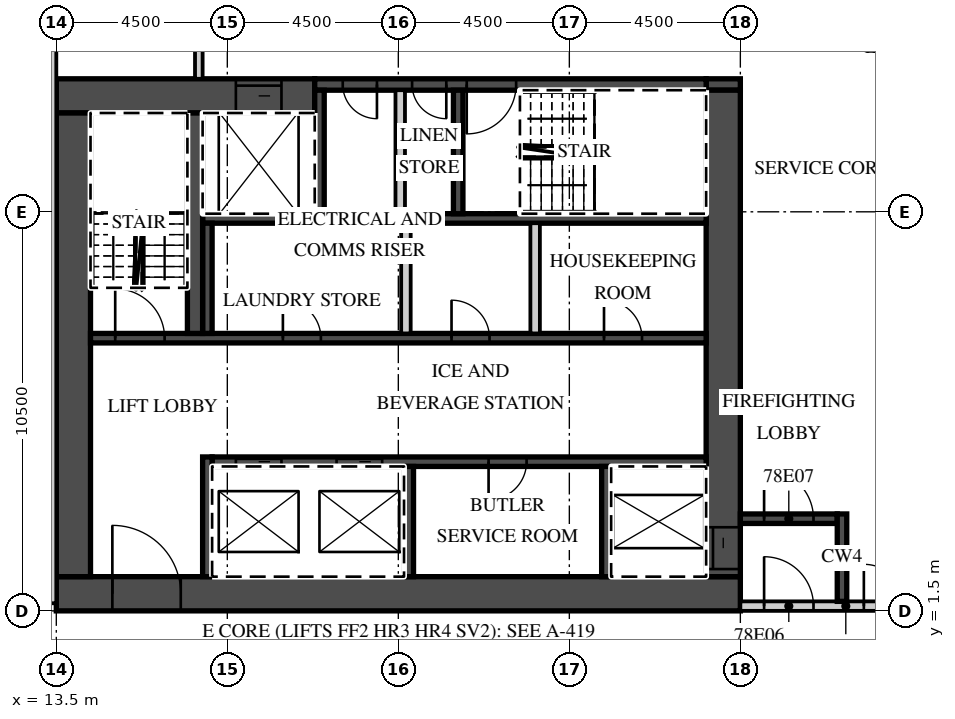
"""IFC4 building model, lengths in metres.
Left out: names, types, materials, properties, quantities, classifications, styles, units other than length and angle.
Written with IfcOpenShell. Run it as: python <this file> out.ifc"""

import sys

from ifc_helpers import new_model, si_unit, direction, frame, frame_2d, origin, place, context, subcontext, project, spatial, rectangle, extrude, element, fill, save


model = new_model("IFC4")
c1 = context("Model", 3, precision=1e-05, world=origin(), true_north=direction((0.0, 1.0)))
c2 = subcontext(c1, "Body", "Model", "MODEL_VIEW")
j1 = project(units=[si_unit("LENGTHUNIT", "METRE"), si_unit("PLANEANGLEUNIT", "RADIAN")], contexts=[c1])
p1 = place(None, origin())
s1 = spatial("IfcSite", under=j1, at=p1, CompositionType="ELEMENT")
p2 = place(p1, origin())
s2 = spatial("IfcBuilding", under=s1, at=p2, CompositionType="ELEMENT")
p3 = place(p2, frame((0.0, 0.0, 308.1)))
s3 = spatial("IfcBuildingStorey", under=s2, at=p3, CompositionType="ELEMENT", Elevation=308.1)
p4 = place(p3, frame((13.5, 1.95, 0.0), z_axis=(0.0, 0.0, 1.0), x_axis=(1.0, 0.0, 0.0)))
e1 = element("IfcWall", 1, at=p4, inside=s3, PredefinedType="SHEAR", context=c2, shape_type="SweptSolid", body=[
    extrude(rectangle(XDim=18.0, YDim=0.9, at=frame_2d((9.0, 0.0))), origin(), (0.0, 0.0, 1.0), 5.1),
])
p5 = place(p4, frame((1.475, 0.0, 0.0)))
e2 = element("IfcOpeningElement", 2, at=p5, cuts=e1, PredefinedType="OPENING", context=c2, shape_type="SweptSolid", body=[
    extrude(rectangle(XDim=1.8, YDim=2.1, at=frame_2d((0.9, 1.05))), frame((0.0, 0.46, 0.0), z_axis=(0.0, -1.0, 0.0), x_axis=(1.0, 0.0, 0.0)), (0.0, 0.0, 1.0), 0.92),
])
p6 = place(p3, frame((13.5, 15.05, 0.0), z_axis=(0.0, 0.0, 1.0), x_axis=(1.0, 0.0, 0.0)))
e3 = element("IfcWall", 3, at=p6, inside=s3, PredefinedType="SHEAR", context=c2, shape_type="SweptSolid", body=[
    extrude(rectangle(XDim=6.8, YDim=0.9, at=frame_2d((3.4, 0.0))), origin(), (0.0, 0.0, 1.0), 5.1),
])
p7 = place(p6, frame((4.725, 0.0, 0.0)))
e4 = element("IfcOpeningElement", 4, at=p7, cuts=e3, PredefinedType="OPENING", context=c2, shape_type="SweptSolid", body=[
    extrude(rectangle(XDim=1.2, YDim=2.1, at=frame_2d((0.6, 1.05))), frame((0.0, 0.46, 0.0), z_axis=(0.0, -1.0, 0.0), x_axis=(1.0, 0.0, 0.0)), (0.0, 0.0, 1.0), 0.92),
])
p8 = place(p3, frame((30.6, 15.35, 0.0), z_axis=(0.0, 0.0, 1.0), x_axis=(1.0, 0.0, 0.0)))
e5 = element("IfcWall", 5, at=p8, inside=s3, PredefinedType="SHEAR", context=c2, shape_type="SweptSolid", body=[
    extrude(rectangle(XDim=0.9, YDim=0.3, at=frame_2d((0.45, 0.0))), origin(), (0.0, 0.0, 1.0), 5.1),
])
p9 = place(p3, frame((20.3, 15.35, 0.0), z_axis=(0.0, 0.0, 1.0), x_axis=(1.0, 0.0, 0.0)))
e6 = element("IfcWall", 6, at=p9, inside=s3, PredefinedType="SHEAR", context=c2, shape_type="SweptSolid", body=[
    extrude(rectangle(XDim=10.3, YDim=0.3, at=frame_2d((5.15, 0.0))), origin(), (0.0, 0.0, 1.0), 5.1),
])
p10 = place(p9, frame((4.0, 0.0, 0.0)))
e7 = element("IfcOpeningElement", 7, at=p10, cuts=e6, PredefinedType="OPENING", context=c2, shape_type="SweptSolid", body=[
    extrude(rectangle(XDim=1.3, YDim=2.1, at=frame_2d((0.65, 1.05))), frame((0.0, 0.16, 0.0), z_axis=(0.0, -1.0, 0.0), x_axis=(1.0, 0.0, 0.0)), (0.0, 0.0, 1.0), 0.32),
])
p11 = place(p9, frame((2.562, 0.0, 0.0)))
e8 = element("IfcOpeningElement", 8, at=p11, cuts=e6, PredefinedType="OPENING", context=c2, shape_type="SweptSolid", body=[
    extrude(rectangle(XDim=0.9, YDim=2.1, at=frame_2d((0.45, 1.05))), frame((0.0, 0.16, 0.0), z_axis=(0.0, -1.0, 0.0), x_axis=(1.0, 0.0, 0.0)), (0.0, 0.0, 1.0), 0.32),
])
p12 = place(p9, frame((0.738, 0.0, 0.0)))
e9 = element("IfcOpeningElement", 9, at=p12, cuts=e6, PredefinedType="OPENING", context=c2, shape_type="SweptSolid", body=[
    extrude(rectangle(XDim=0.9, YDim=2.1, at=frame_2d((0.45, 1.05))), frame((0.0, 0.16, 0.0), z_axis=(0.0, -1.0, 0.0), x_axis=(1.0, 0.0, 0.0)), (0.0, 0.0, 1.0), 0.32),
])
p13 = place(p3, frame((31.05, 2.4, 0.0), z_axis=(0.0, 0.0, 1.0), x_axis=(0.0, 1.0, 0.0)))
e10 = element("IfcWall", 10, at=p13, inside=s3, PredefinedType="SHEAR", context=c2, shape_type="SweptSolid", body=[
    extrude(rectangle(XDim=12.8, YDim=0.9, at=frame_2d((6.4, 0.0))), origin(), (0.0, 0.0, 1.0), 5.1),
])
p14 = place(p13, frame((0.2, 0.0, 0.0)))
e11 = element("IfcOpeningElement", 11, at=p14, cuts=e10, PredefinedType="OPENING", context=c2, shape_type="SweptSolid", body=[
    extrude(rectangle(XDim=1.1, YDim=2.1, at=frame_2d((0.55, 1.05))), frame((0.0, 0.46, 0.0), z_axis=(0.0, -1.0, 0.0), x_axis=(1.0, 0.0, 0.0)), (0.0, 0.0, 1.0), 0.92),
])
p15 = place(p3, frame((13.95, 2.4, 0.0), z_axis=(0.0, 0.0, 1.0), x_axis=(0.0, 1.0, 0.0)))
e12 = element("IfcWall", 12, at=p15, inside=s3, PredefinedType="SHEAR", context=c2, shape_type="SweptSolid", body=[
    extrude(rectangle(XDim=12.2, YDim=0.9, at=frame_2d((6.1, 0.0))), origin(), (0.0, 0.0, 1.0), 5.1),
])
p16 = place(p3, frame((17.6, 5.425, 0.0), z_axis=(0.0, 0.0, 1.0), x_axis=(1.0, 0.0, 0.0)))
e13 = element("IfcWall", 13, at=p16, inside=s3, PredefinedType="SHEAR", context=c2, shape_type="SweptSolid", body=[
    extrude(rectangle(XDim=13.0, YDim=0.25, at=frame_2d((6.5, 0.0))), origin(), (0.0, 0.0, 1.0), 5.1),
])
p17 = place(p16, frame((3.275, 0.0, 0.0)))
e14 = element("IfcOpeningElement", 14, at=p17, cuts=e13, PredefinedType="OPENING", context=c2, shape_type="SweptSolid", body=[
    extrude(rectangle(XDim=1.2, YDim=2.1, at=frame_2d((0.6, 1.05))), frame((0.0, 0.135, 0.0), z_axis=(0.0, -1.0, 0.0), x_axis=(1.0, 0.0, 0.0)), (0.0, 0.0, 1.0), 0.27),
])
p18 = place(p16, frame((0.625, 0.0, 0.0)))
e15 = element("IfcOpeningElement", 15, at=p18, cuts=e13, PredefinedType="OPENING", context=c2, shape_type="SweptSolid", body=[
    extrude(rectangle(XDim=1.2, YDim=2.1, at=frame_2d((0.6, 1.05))), frame((0.0, 0.135, 0.0), z_axis=(0.0, -1.0, 0.0), x_axis=(1.0, 0.0, 0.0)), (0.0, 0.0, 1.0), 0.27),
])
p19 = place(p16, frame((7.275, 0.0, 0.0)))
e16 = element("IfcOpeningElement", 16, at=p19, cuts=e13, PredefinedType="OPENING", context=c2, shape_type="SweptSolid", body=[
    extrude(rectangle(XDim=1.0, YDim=2.1, at=frame_2d((0.5, 1.05))), frame((0.0, 0.135, 0.0), z_axis=(0.0, -1.0, 0.0), x_axis=(1.0, 0.0, 0.0)), (0.0, 0.0, 1.0), 0.27),
])
p20 = place(p3, frame((17.475, 2.4, 0.0), z_axis=(0.0, 0.0, 1.0), x_axis=(0.0, 1.0, 0.0)))
e17 = element("IfcWall", 17, at=p20, inside=s3, PredefinedType="SHEAR", context=c2, shape_type="SweptSolid", body=[
    extrude(rectangle(XDim=3.15, YDim=0.25, at=frame_2d((1.575, 0.0))), origin(), (0.0, 0.0, 1.0), 5.1),
])
for number, where, z_axis, x_axis in (
    (18, (27.975, 2.4, 0.0), (0.0, 0.0, 1.0), (0.0, 1.0, 0.0)),
    (19, (22.775, 2.4, 0.0), (0.0, 0.0, 1.0), (0.0, 1.0, 0.0)),
):
    element("IfcWall", number, at=place(p3, frame(where, z_axis=z_axis, x_axis=x_axis)), inside=s3, PredefinedType="SHEAR", context=c2, shape_type="SweptSolid", body=[
        extrude(rectangle(XDim=2.9, YDim=0.25, at=frame_2d((1.45, 0.0))), origin(), (0.0, 0.0, 1.0), 5.1),
    ])
p21 = place(p3, frame((14.4, 8.675, 0.0), z_axis=(0.0, 0.0, 1.0), x_axis=(1.0, 0.0, 0.0)))
e20 = element("IfcWall", 20, at=p21, inside=s3, PredefinedType="SHEAR", context=c2, shape_type="SweptSolid", body=[
    extrude(rectangle(XDim=16.2, YDim=0.25, at=frame_2d((8.1, 0.0))), origin(), (0.0, 0.0, 1.0), 5.1),
])
p22 = place(p21, frame((0.65, 0.0, 0.0)))
e21 = element("IfcOpeningElement", 21, at=p22, cuts=e20, PredefinedType="OPENING", context=c2, shape_type="SweptSolid", body=[
    extrude(rectangle(XDim=1.3, YDim=2.1, at=frame_2d((0.65, 1.05))), frame((0.0, 0.135, 0.0), z_axis=(0.0, -1.0, 0.0), x_axis=(1.0, 0.0, 0.0)), (0.0, 0.0, 1.0), 0.27),
])
p23 = place(p21, frame((13.512, 0.0, 0.0)))
e22 = element("IfcOpeningElement", 22, at=p23, cuts=e20, PredefinedType="OPENING", context=c2, shape_type="SweptSolid", body=[
    extrude(rectangle(XDim=1.0, YDim=2.1, at=frame_2d((0.5, 1.05))), frame((0.0, 0.135, 0.0), z_axis=(0.0, -1.0, 0.0), x_axis=(1.0, 0.0, 0.0)), (0.0, 0.0, 1.0), 0.27),
])
p24 = place(p21, frame((9.5, 0.0, 0.0)))
e23 = element("IfcOpeningElement", 23, at=p24, cuts=e20, PredefinedType="OPENING", context=c2, shape_type="SweptSolid", body=[
    extrude(rectangle(XDim=1.0, YDim=2.1, at=frame_2d((0.5, 1.05))), frame((0.0, 0.135, 0.0), z_axis=(0.0, -1.0, 0.0), x_axis=(1.0, 0.0, 0.0)), (0.0, 0.0, 1.0), 0.27),
])
p25 = place(p21, frame((5.062, 0.0, 0.0)))
e24 = element("IfcOpeningElement", 24, at=p25, cuts=e20, PredefinedType="OPENING", context=c2, shape_type="SweptSolid", body=[
    extrude(rectangle(XDim=1.0, YDim=2.1, at=frame_2d((0.5, 1.05))), frame((0.0, 0.135, 0.0), z_axis=(0.0, -1.0, 0.0), x_axis=(1.0, 0.0, 0.0)), (0.0, 0.0, 1.0), 0.27),
])
p26 = place(p3, frame((17.35, 11.825, 0.0), z_axis=(0.0, 0.0, 1.0), x_axis=(1.0, 0.0, 0.0)))
e25 = element("IfcWall", 25, at=p26, inside=s3, PredefinedType="SHEAR", context=c2, shape_type="SweptSolid", body=[
    extrude(rectangle(XDim=13.25, YDim=0.25, at=frame_2d((6.625, 0.0))), origin(), (0.0, 0.0, 1.0), 5.1),
])
p27 = place(p3, frame((17.475, 8.8, 0.0), z_axis=(0.0, 0.0, 1.0), x_axis=(0.0, 1.0, 0.0)))
e26 = element("IfcWall", 26, at=p27, inside=s3, PredefinedType="SHEAR", context=c2, shape_type="SweptSolid", body=[
    extrude(rectangle(XDim=2.9, YDim=0.25, at=frame_2d((1.45, 0.0))), origin(), (0.0, 0.0, 1.0), 5.1),
])
for number, where, z_axis, x_axis in (
    (27, (26.1, 8.8, 0.0), (0.0, 0.0, 1.0), (0.0, 1.0, 0.0)),
    (28, (22.7, 8.8, 0.0), (0.0, 0.0, 1.0), (0.0, 1.0, 0.0)),
):
    element("IfcWall", number, at=place(p3, frame(where, z_axis=z_axis, x_axis=x_axis)), inside=s3, PredefinedType="PARTITIONING", context=c2, shape_type="SweptSolid", body=[
        extrude(rectangle(XDim=2.9, YDim=0.25, at=frame_2d((1.45, 0.0))), origin(), (0.0, 0.0, 1.0), 5.1),
    ])
p28 = place(p3, frame((17.15, 8.8, 0.0), z_axis=(0.0, 0.0, 1.0), x_axis=(0.0, 1.0, 0.0)))
e29 = element("IfcWall", 29, at=p28, inside=s3, PredefinedType="SHEAR", context=c2, shape_type="SweptSolid", body=[
    extrude(rectangle(XDim=5.8, YDim=0.4, at=frame_2d((2.9, 0.0))), origin(), (0.0, 0.0, 1.0), 5.1),
])
for number, where, z_axis, x_axis in (
    (30, (20.425, 11.95, 0.0), (0.0, 0.0, 1.0), (0.0, 1.0, 0.0)),
    (31, (24.075, 11.95, 0.0), (0.0, 0.0, 1.0), (0.0, 1.0, 0.0)),
):
    element("IfcWall", number, at=place(p3, frame(where, z_axis=z_axis, x_axis=x_axis)), inside=s3, PredefinedType="SHEAR", context=c2, shape_type="SweptSolid", body=[
        extrude(rectangle(XDim=3.25, YDim=0.25, at=frame_2d((1.625, 0.0))), origin(), (0.0, 0.0, 1.0), 5.1),
    ])
p29 = place(p3, frame((22.55, 11.95, 0.0), z_axis=(0.0, 0.0, 1.0), x_axis=(0.0, 1.0, 0.0)))
e32 = element("IfcWall", 32, at=p29, inside=s3, PredefinedType="PARTITIONING", context=c2, shape_type="SweptSolid", body=[
    extrude(rectangle(XDim=3.25, YDim=0.25, at=frame_2d((1.625, 0.0))), origin(), (0.0, 0.0, 1.0), 5.1),
])
p30 = place(p3, frame((31.5, 1.625, 0.0), z_axis=(0.0, 0.0, 1.0), x_axis=(1.0, 0.0, 0.0)))
e33 = element("IfcWall", 33, at=p30, inside=s3, PredefinedType="PARTITIONING", context=c2, shape_type="SweptSolid", body=[
    extrude(rectangle(XDim=5.55, YDim=0.25, at=frame_2d((2.775, 0.0))), origin(), (0.0, 0.0, 1.0), 5.1),
])
p31 = place(p30, frame((0.625, 0.0, 0.0)))
e34 = element("IfcOpeningElement", 34, at=p31, cuts=e33, PredefinedType="OPENING", context=c2, shape_type="SweptSolid", body=[
    extrude(rectangle(XDim=1.3, YDim=2.1, at=frame_2d((0.65, 1.05))), frame((0.0, 0.135, 0.0), z_axis=(0.0, -1.0, 0.0), x_axis=(1.0, 0.0, 0.0)), (0.0, 0.0, 1.0), 0.27),
])
p32 = place(p30, frame((3.25, 0.0, 0.0)))
e35 = element("IfcOpeningElement", 35, at=p32, cuts=e33, PredefinedType="OPENING", context=c2, shape_type="SweptSolid", body=[
    extrude(rectangle(XDim=1.1, YDim=2.1, at=frame_2d((0.55, 1.05))), frame((0.0, 0.135, 0.0), z_axis=(0.0, -1.0, 0.0), x_axis=(1.0, 0.0, 0.0)), (0.0, 0.0, 1.0), 0.27),
])
p33 = place(p3, frame((31.5, 3.925, 0.0), z_axis=(0.0, 0.0, 1.0), x_axis=(1.0, 0.0, 0.0)))
e36 = element("IfcWall", 36, at=p33, inside=s3, PredefinedType="SHEAR", context=c2, shape_type="SweptSolid", body=[
    extrude(rectangle(XDim=2.55, YDim=0.25, at=frame_2d((1.275, 0.0))), origin(), (0.0, 0.0, 1.0), 5.1),
])
p34 = place(p33, frame((0.625, 0.0, 0.0)))
e37 = element("IfcOpeningElement", 37, at=p34, cuts=e36, PredefinedType="OPENING", context=c2, shape_type="SweptSolid", body=[
    extrude(rectangle(XDim=1.3, YDim=2.1, at=frame_2d((0.65, 1.05))), frame((0.0, 0.135, 0.0), z_axis=(0.0, -1.0, 0.0), x_axis=(1.0, 0.0, 0.0)), (0.0, 0.0, 1.0), 0.27),
])
p35 = place(p3, frame((34.175, 1.75, 0.0), z_axis=(0.0, 0.0, 1.0), x_axis=(0.0, 1.0, 0.0)))
e38 = element("IfcWall", 38, at=p35, inside=s3, PredefinedType="SHEAR", context=c2, shape_type="SweptSolid", body=[
    extrude(rectangle(XDim=2.3, YDim=0.25, at=frame_2d((1.15, 0.0))), origin(), (0.0, 0.0, 1.0), 5.1),
])
p36 = place(p3, frame((17.25, 15.5, 0.0), z_axis=(0.0, 0.0, 1.0), x_axis=(0.0, 1.0, 0.0)))
e39 = element("IfcWall", 39, at=p36, inside=s3, PredefinedType="PARTITIONING", context=c2, shape_type="SweptSolid", body=[
    extrude(rectangle(XDim=2.55, YDim=0.2, at=frame_2d((1.275, 0.0))), origin(), (0.0, 0.0, 1.0), 5.1),
])
p37 = place(p3, frame((13.4, 1.7, 0.0), z_axis=(0.0, 0.0, 1.0), x_axis=(0.0, 1.0, 0.0)))
e40 = element("IfcWall", 40, at=p37, inside=s3, PredefinedType="PARTITIONING", context=c2, shape_type="SweptSolid", body=[
    extrude(rectangle(XDim=16.35, YDim=0.2, at=frame_2d((8.175, 0.0))), origin(), (0.0, 0.0, 1.0), 5.1),
])
p38 = place(p17, origin())
e41 = element("IfcDoor", 41, at=p38, inside=s3, OperationType="SLIDING_TO_RIGHT", PredefinedType="DOOR", context=c2, shape_type="SweptSolid", body=[
    extrude(rectangle(XDim=1.2, YDim=2.1, at=frame_2d((0.6, 1.05))), frame((0.0, 0.025, 0.0), z_axis=(0.0, -1.0, 0.0), x_axis=(1.0, 0.0, 0.0)), (0.0, 0.0, 1.0), 0.05),
])
fill(e14, e41)
p39 = place(p18, origin())
e42 = element("IfcDoor", 42, at=p39, inside=s3, OperationType="SLIDING_TO_LEFT", PredefinedType="DOOR", context=c2, shape_type="SweptSolid", body=[
    extrude(rectangle(XDim=1.2, YDim=2.1, at=frame_2d((0.6, 1.05))), frame((0.0, 0.025, 0.0), z_axis=(0.0, -1.0, 0.0), x_axis=(1.0, 0.0, 0.0)), (0.0, 0.0, 1.0), 0.05),
])
fill(e15, e42)
p40 = place(p7, origin())
e43 = element("IfcDoor", 43, at=p40, inside=s3, OperationType="SLIDING_TO_LEFT", PredefinedType="DOOR", context=c2, shape_type="SweptSolid", body=[
    extrude(rectangle(XDim=1.2, YDim=2.1, at=frame_2d((0.6, 1.05))), frame((0.0, 0.025, 0.0), z_axis=(0.0, -1.0, 0.0), x_axis=(1.0, 0.0, 0.0)), (0.0, 0.0, 1.0), 0.05),
])
fill(e4, e43)
p41 = place(p14, origin())
e44 = element("IfcDoor", 44, at=p41, inside=s3, OperationType="SLIDING_TO_LEFT", PredefinedType="DOOR", context=c2, shape_type="SweptSolid", body=[
    extrude(rectangle(XDim=1.1, YDim=2.1, at=frame_2d((0.55, 1.05))), frame((0.0, 0.025, 0.0), z_axis=(0.0, -1.0, 0.0), x_axis=(1.0, 0.0, 0.0)), (0.0, 0.0, 1.0), 0.05),
])
fill(e11, e44)
p42 = place(p5, origin())
e45 = element("IfcDoor", 45, at=p42, inside=s3, OperationType="DOUBLE_DOOR_DOUBLE_SWING", PredefinedType="DOOR", context=c2, shape_type="SweptSolid", body=[
    extrude(rectangle(XDim=1.8, YDim=2.1, at=frame_2d((0.9, 1.05))), frame((0.0, 0.025, 0.0), z_axis=(0.0, -1.0, 0.0), x_axis=(1.0, 0.0, 0.0)), (0.0, 0.0, 1.0), 0.05),
])
fill(e2, e45)
p43 = place(p31, origin())
e46 = element("IfcDoor", 46, at=p43, inside=s3, OperationType="SINGLE_SWING_LEFT", PredefinedType="DOOR", context=c2, shape_type="SweptSolid", body=[
    extrude(rectangle(XDim=1.3, YDim=2.1, at=frame_2d((0.65, 1.05))), frame((0.0, 0.025, 0.0), z_axis=(0.0, -1.0, 0.0), x_axis=(1.0, 0.0, 0.0)), (0.0, 0.0, 1.0), 0.05),
])
fill(e34, e46)
p44 = place(p34, origin())
e47 = element("IfcDoor", 47, at=p44, inside=s3, OperationType="SINGLE_SWING_LEFT", PredefinedType="DOOR", context=c2, shape_type="SweptSolid", body=[
    extrude(rectangle(XDim=1.3, YDim=2.1, at=frame_2d((0.65, 1.05))), frame((0.0, 0.025, 0.0), z_axis=(0.0, -1.0, 0.0), x_axis=(1.0, 0.0, 0.0)), (0.0, 0.0, 1.0), 0.05),
])
fill(e37, e47)
p45 = place(p32, origin())
e48 = element("IfcDoor", 48, at=p45, inside=s3, OperationType="SINGLE_SWING_LEFT", PredefinedType="DOOR", context=c2, shape_type="SweptSolid", body=[
    extrude(rectangle(XDim=1.1, YDim=2.1, at=frame_2d((0.55, 1.05))), frame((0.0, 0.025, 0.0), z_axis=(0.0, -1.0, 0.0), x_axis=(1.0, 0.0, 0.0)), (0.0, 0.0, 1.0), 0.05),
])
fill(e35, e48)
p46 = place(p22, origin())
e49 = element("IfcDoor", 49, at=p46, inside=s3, OperationType="SINGLE_SWING_LEFT", PredefinedType="DOOR", context=c2, shape_type="SweptSolid", body=[
    extrude(rectangle(XDim=1.3, YDim=2.1, at=frame_2d((0.65, 1.05))), frame((0.0, 0.025, 0.0), z_axis=(0.0, -1.0, 0.0), x_axis=(1.0, 0.0, 0.0)), (0.0, 0.0, 1.0), 0.05),
])
fill(e21, e49)
p47 = place(p10, origin())
e50 = element("IfcDoor", 50, at=p47, inside=s3, OperationType="SINGLE_SWING_LEFT", PredefinedType="DOOR", context=c2, shape_type="SweptSolid", body=[
    extrude(rectangle(XDim=1.3, YDim=2.1, at=frame_2d((0.65, 1.05))), frame((0.0, 0.025, 0.0), z_axis=(0.0, -1.0, 0.0), x_axis=(1.0, 0.0, 0.0)), (0.0, 0.0, 1.0), 0.05),
])
fill(e7, e50)
p48 = place(p11, origin())
e51 = element("IfcDoor", 51, at=p48, inside=s3, OperationType="SINGLE_SWING_RIGHT", PredefinedType="DOOR", context=c2, shape_type="SweptSolid", body=[
    extrude(rectangle(XDim=0.9, YDim=2.1, at=frame_2d((0.45, 1.05))), frame((0.0, 0.025, 0.0), z_axis=(0.0, -1.0, 0.0), x_axis=(1.0, 0.0, 0.0)), (0.0, 0.0, 1.0), 0.05),
])
fill(e8, e51)
p49 = place(p12, origin())
e52 = element("IfcDoor", 52, at=p49, inside=s3, OperationType="SINGLE_SWING_RIGHT", PredefinedType="DOOR", context=c2, shape_type="SweptSolid", body=[
    extrude(rectangle(XDim=0.9, YDim=2.1, at=frame_2d((0.45, 1.05))), frame((0.0, 0.025, 0.0), z_axis=(0.0, -1.0, 0.0), x_axis=(1.0, 0.0, 0.0)), (0.0, 0.0, 1.0), 0.05),
])
fill(e9, e52)
p50 = place(p23, origin())
e53 = element("IfcDoor", 53, at=p50, inside=s3, OperationType="SINGLE_SWING_LEFT", PredefinedType="DOOR", context=c2, shape_type="SweptSolid", body=[
    extrude(rectangle(XDim=1.0, YDim=2.1, at=frame_2d((0.5, 1.05))), frame((0.0, 0.025, 0.0), z_axis=(0.0, -1.0, 0.0), x_axis=(1.0, 0.0, 0.0)), (0.0, 0.0, 1.0), 0.05),
])
fill(e22, e53)
p51 = place(p24, origin())
e54 = element("IfcDoor", 54, at=p51, inside=s3, OperationType="SINGLE_SWING_LEFT", PredefinedType="DOOR", context=c2, shape_type="SweptSolid", body=[
    extrude(rectangle(XDim=1.0, YDim=2.1, at=frame_2d((0.5, 1.05))), frame((0.0, 0.025, 0.0), z_axis=(0.0, -1.0, 0.0), x_axis=(1.0, 0.0, 0.0)), (0.0, 0.0, 1.0), 0.05),
])
fill(e23, e54)
p52 = place(p25, origin())
e55 = element("IfcDoor", 55, at=p52, inside=s3, OperationType="SINGLE_SWING_LEFT", PredefinedType="DOOR", context=c2, shape_type="SweptSolid", body=[
    extrude(rectangle(XDim=1.0, YDim=2.1, at=frame_2d((0.5, 1.05))), frame((0.0, 0.025, 0.0), z_axis=(0.0, -1.0, 0.0), x_axis=(1.0, 0.0, 0.0)), (0.0, 0.0, 1.0), 0.05),
])
fill(e24, e55)
p53 = place(p19, origin())
e56 = element("IfcDoor", 56, at=p53, inside=s3, OperationType="SINGLE_SWING_LEFT", PredefinedType="DOOR", context=c2, shape_type="SweptSolid", body=[
    extrude(rectangle(XDim=1.0, YDim=2.1, at=frame_2d((0.5, 1.05))), frame((0.0, 0.025, 0.0), z_axis=(0.0, -1.0, 0.0), x_axis=(1.0, 0.0, 0.0)), (0.0, 0.0, 1.0), 0.05),
])
fill(e16, e56)
save(model, sys.argv[1])
